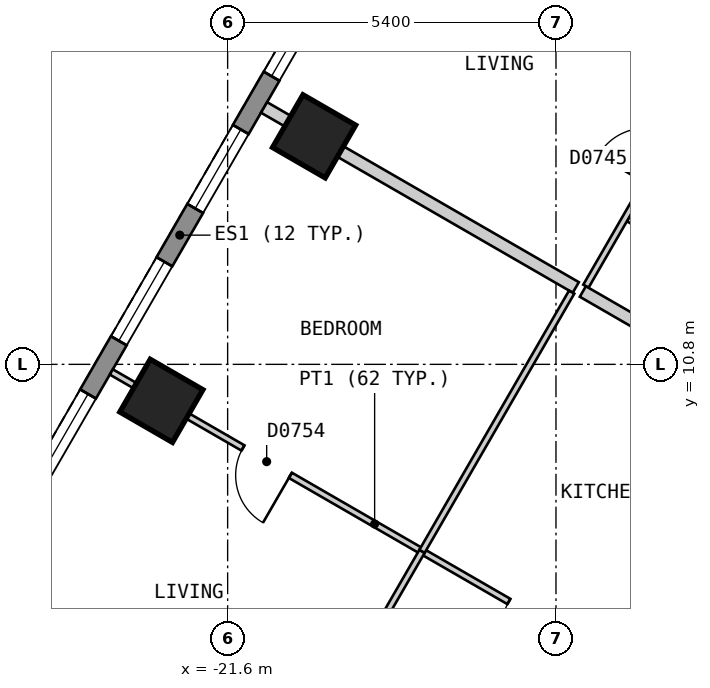
"""IFC4 building model, lengths in metres.
Left out: names, types, materials, properties, quantities, classifications, styles, units other than length and angle.
Written with IfcOpenShell. Run it as: python <this file> out.ifc"""

import sys

from ifc_helpers import new_model, si_unit, direction, frame, frame_2d, origin, origin_2d, place, context, subcontext, project, spatial, polyline, rectangle, outline, extrude, element, fill, save


model = new_model("IFC4")
c1 = context("Model", 3, precision=1e-05, world=origin(), true_north=direction((0.0, 1.0)))
c2 = subcontext(c1, "Body", "Model", "MODEL_VIEW")
j1 = project(units=[si_unit("LENGTHUNIT", "METRE"), si_unit("PLANEANGLEUNIT", "RADIAN")], contexts=[c1])
p1 = place(None, origin())
s1 = spatial("IfcSite", under=j1, at=p1, CompositionType="ELEMENT")
p2 = place(p1, origin())
s2 = spatial("IfcBuilding", under=s1, at=p2, CompositionType="ELEMENT")
p3 = place(p2, frame((0.0, 0.0, 93.0)))
s3 = spatial("IfcBuildingStorey", under=s2, at=p3, CompositionType="ELEMENT", Elevation=93.0)
for number, where, z_axis, x_axis in (
    (1, (-20.178, 14.55, 0.0), (0.0, 0.0, 1.0), (-0.5, -0.866, 0.0)),
    (2, (-22.69, 10.2, 0.0), (0.0, 0.0, 1.0), (-0.5, -0.866, 0.0)),
):
    element("IfcColumn", number, at=place(p3, frame(where, z_axis=z_axis, x_axis=x_axis)), inside=s3, PredefinedType="COLUMN", context=c2, shape_type="SweptSolid", body=[
        extrude(rectangle(XDim=1.0, YDim=1.0, at=origin_2d()), origin(), (0.0, 0.0, 1.0), 3.0),
    ])
p4 = place(p3, frame((-15.747, 24.425, 0.0), z_axis=(0.0, 0.0, 1.0), x_axis=(-0.500027479704, -0.866009537788, 0.0)))
e3 = element("IfcWall", 3, at=p4, inside=s3, PredefinedType="SOLIDWALL", context=c2, shape_type="SweptSolid", body=[
    extrude(outline(polyline([(0.0, -0.15), (26.559, -0.15), (26.478, 0.15), (0.08, 0.15), (0.0, -0.15)])), origin(), (0.0, 0.0, 1.0), 2.7),
])
p5 = place(p4, frame((1.227, 0.0, 0.15)))
e4 = element("IfcOpeningElement", 4, at=p5, cuts=e3, PredefinedType="OPENING", context=c2, shape_type="SweptSolid", body=[
    extrude(rectangle(XDim=1.5, YDim=2.1, at=frame_2d((0.75, 1.05))), frame((0.0, 0.16, 0.0), z_axis=(0.0, -1.0, 0.0), x_axis=(1.0, 0.0, 0.0)), (0.0, 0.0, 1.0), 0.32),
])
p6 = place(p4, frame((3.739, 0.0, 0.15)))
e5 = element("IfcOpeningElement", 5, at=p6, cuts=e3, PredefinedType="OPENING", context=c2, shape_type="SweptSolid", body=[
    extrude(rectangle(XDim=1.5, YDim=2.1, at=frame_2d((0.75, 1.05))), frame((0.0, 0.16, 0.0), z_axis=(0.0, -1.0, 0.0), x_axis=(1.0, 0.0, 0.0)), (0.0, 0.0, 1.0), 0.32),
])
p7 = place(p4, frame((6.25, 0.0, 0.15)))
e6 = element("IfcOpeningElement", 6, at=p7, cuts=e3, PredefinedType="OPENING", context=c2, shape_type="SweptSolid", body=[
    extrude(rectangle(XDim=1.5, YDim=2.1, at=frame_2d((0.75, 1.05))), frame((0.0, 0.16, 0.0), z_axis=(0.0, -1.0, 0.0), x_axis=(1.0, 0.0, 0.0)), (0.0, 0.0, 1.0), 0.32),
])
p8 = place(p4, frame((8.761, 0.0, 0.15)))
e7 = element("IfcOpeningElement", 7, at=p8, cuts=e3, PredefinedType="OPENING", context=c2, shape_type="SweptSolid", body=[
    extrude(rectangle(XDim=1.5, YDim=2.1, at=frame_2d((0.75, 1.05))), frame((0.0, 0.16, 0.0), z_axis=(0.0, -1.0, 0.0), x_axis=(1.0, 0.0, 0.0)), (0.0, 0.0, 1.0), 0.32),
])
p9 = place(p4, frame((11.273, 0.0, 0.15)))
e8 = element("IfcOpeningElement", 8, at=p9, cuts=e3, PredefinedType="OPENING", context=c2, shape_type="SweptSolid", body=[
    extrude(rectangle(XDim=1.5, YDim=2.1, at=frame_2d((0.75, 1.05))), frame((0.0, 0.16, 0.0), z_axis=(0.0, -1.0, 0.0), x_axis=(1.0, 0.0, 0.0)), (0.0, 0.0, 1.0), 0.32),
])
p10 = place(p4, frame((13.785, 0.0, 0.15)))
e9 = element("IfcOpeningElement", 9, at=p10, cuts=e3, PredefinedType="OPENING", context=c2, shape_type="SweptSolid", body=[
    extrude(rectangle(XDim=1.5, YDim=2.1, at=frame_2d((0.75, 1.05))), frame((0.0, 0.16, 0.0), z_axis=(0.0, -1.0, 0.0), x_axis=(1.0, 0.0, 0.0)), (0.0, 0.0, 1.0), 0.32),
])
p11 = place(p4, frame((16.296, 0.0, 0.15)))
e10 = element("IfcOpeningElement", 10, at=p11, cuts=e3, PredefinedType="OPENING", context=c2, shape_type="SweptSolid", body=[
    extrude(rectangle(XDim=1.5, YDim=2.1, at=frame_2d((0.75, 1.05))), frame((0.0, 0.16, 0.0), z_axis=(0.0, -1.0, 0.0), x_axis=(1.0, 0.0, 0.0)), (0.0, 0.0, 1.0), 0.32),
])
p12 = place(p4, frame((18.807, 0.0, 0.15)))
e11 = element("IfcOpeningElement", 11, at=p12, cuts=e3, PredefinedType="OPENING", context=c2, shape_type="SweptSolid", body=[
    extrude(rectangle(XDim=1.5, YDim=2.1, at=frame_2d((0.75, 1.05))), frame((0.0, 0.16, 0.0), z_axis=(0.0, -1.0, 0.0), x_axis=(1.0, 0.0, 0.0)), (0.0, 0.0, 1.0), 0.32),
])
p13 = place(p4, frame((21.319, 0.0, 0.15)))
e12 = element("IfcOpeningElement", 12, at=p13, cuts=e3, PredefinedType="OPENING", context=c2, shape_type="SweptSolid", body=[
    extrude(rectangle(XDim=1.5, YDim=2.1, at=frame_2d((0.75, 1.05))), frame((0.0, 0.16, 0.0), z_axis=(0.0, -1.0, 0.0), x_axis=(1.0, 0.0, 0.0)), (0.0, 0.0, 1.0), 0.32),
])
p14 = place(p4, frame((23.831, 0.0, 0.15)))
e13 = element("IfcOpeningElement", 13, at=p14, cuts=e3, PredefinedType="OPENING", context=c2, shape_type="SweptSolid", body=[
    extrude(rectangle(XDim=1.5, YDim=2.1, at=frame_2d((0.75, 1.05))), frame((0.0, 0.16, 0.0), z_axis=(0.0, -1.0, 0.0), x_axis=(1.0, 0.0, 0.0)), (0.0, 0.0, 1.0), 0.32),
])
p15 = place(p3, frame((-16.05, -1.0, 0.0), z_axis=(0.0, 0.0, 1.0), x_axis=(0.499962449088, 0.866047082728, 0.0)))
e14 = element("IfcWall", 14, at=p15, inside=s3, PredefinedType="PARTITIONING", context=c2, shape_type="SweptSolid", body=[
    extrude(rectangle(XDim=10.391, YDim=0.2, at=frame_2d((5.195, 0.0))), origin(), (0.0, 0.0, 1.0), 2.7),
])
p16 = place(p15, frame((4.745, 0.0, 0.0)))
e15 = element("IfcOpeningElement", 15, at=p16, cuts=e14, PredefinedType="OPENING", context=c2, shape_type="SweptSolid", body=[
    extrude(rectangle(XDim=0.9, YDim=2.1, at=frame_2d((0.45, 1.05))), frame((0.0, 0.11, 0.0), z_axis=(0.0, -1.0, 0.0), x_axis=(1.0, 0.0, 0.0)), (0.0, 0.0, 1.0), 0.22),
])
p17 = place(p3, frame((-18.533, -0.901, 0.0), z_axis=(0.0, 0.0, 1.0), x_axis=(0.499981198768, 0.866036258409, 0.0)))
e16 = element("IfcWall", 16, at=p17, inside=s3, PredefinedType="PARTITIONING", context=c2, shape_type="SweptSolid", body=[
    extrude(rectangle(XDim=20.093, YDim=0.2, at=frame_2d((10.046, 0.0))), origin(), (0.0, 0.0, 1.0), 2.7),
])
p18 = place(p17, frame((14.57, 0.0, 0.0)))
e17 = element("IfcOpeningElement", 17, at=p18, cuts=e16, PredefinedType="OPENING", context=c2, shape_type="SweptSolid", body=[
    extrude(rectangle(XDim=1.0, YDim=2.1, at=frame_2d((0.5, 1.05))), frame((0.0, 0.11, 0.0), z_axis=(0.0, -1.0, 0.0), x_axis=(1.0, 0.0, 0.0)), (0.0, 0.0, 1.0), 0.22),
])
p19 = place(p17, frame((4.523, 0.0, 0.0)))
e18 = element("IfcOpeningElement", 18, at=p19, cuts=e16, PredefinedType="OPENING", context=c2, shape_type="SweptSolid", body=[
    extrude(rectangle(XDim=1.0, YDim=2.1, at=frame_2d((0.5, 1.05))), frame((0.0, 0.11, 0.0), z_axis=(0.0, -1.0, 0.0), x_axis=(1.0, 0.0, 0.0)), (0.0, 0.0, 1.0), 0.22),
])
p20 = place(p3, frame((-23.513, 10.675, 0.0), z_axis=(0.0, 0.0, 1.0), x_axis=(0.866041268327, -0.499972520799, 0.0)))
e19 = element("IfcWall", 19, at=p20, inside=s3, PredefinedType="PARTITIONING", context=c2, shape_type="SweptSolid", body=[
    extrude(rectangle(XDim=10.0, YDim=0.1, at=frame_2d((5.0, 0.0))), origin(), (0.0, 0.0, 1.0), 2.7),
])
p21 = place(p20, frame((7.55, 0.0, 0.0)))
e20 = element("IfcOpeningElement", 20, at=p21, cuts=e19, PredefinedType="OPENING", context=c2, shape_type="SweptSolid", body=[
    extrude(rectangle(XDim=0.9, YDim=2.1, at=frame_2d((0.45, 1.05))), frame((0.0, 0.06, 0.0), z_axis=(0.0, -1.0, 0.0), x_axis=(1.0, 0.0, 0.0)), (0.0, 0.0, 1.0), 0.12),
])
p22 = place(p20, frame((2.5, 0.0, 0.0)))
e21 = element("IfcOpeningElement", 21, at=p22, cuts=e19, PredefinedType="OPENING", context=c2, shape_type="SweptSolid", body=[
    extrude(rectangle(XDim=0.9, YDim=2.1, at=frame_2d((0.45, 1.05))), frame((0.0, 0.06, 0.0), z_axis=(0.0, -1.0, 0.0), x_axis=(1.0, 0.0, 0.0)), (0.0, 0.0, 1.0), 0.12),
])
p23 = place(p3, frame((-15.009, 13.196, 0.0), z_axis=(0.0, 0.0, 1.0), x_axis=(0.865916335424, -0.500188864377, 0.0)))
e22 = element("IfcWall", 22, at=p23, inside=s3, PredefinedType="PARTITIONING", context=c2, shape_type="SweptSolid", body=[
    extrude(rectangle(XDim=3.896, YDim=0.1, at=frame_2d((1.948, 0.0))), origin(), (0.0, 0.0, 1.0), 2.7),
])
p24 = place(p23, frame((1.573, 0.0, 0.0)))
e23 = element("IfcOpeningElement", 23, at=p24, cuts=e22, PredefinedType="OPENING", context=c2, shape_type="SweptSolid", body=[
    extrude(rectangle(XDim=0.8, YDim=2.1, at=frame_2d((0.4, 1.05))), frame((0.0, 0.06, 0.0), z_axis=(0.0, -1.0, 0.0), x_axis=(1.0, 0.0, 0.0)), (0.0, 0.0, 1.0), 0.12),
])
p25 = place(p3, frame((-18.489, 19.375, 0.0), z_axis=(0.0, 0.0, 1.0), x_axis=(0.866016855193, -0.500014806302, 0.0)))
e24 = element("IfcWall", 24, at=p25, inside=s3, PredefinedType="PARTITIONING", context=c2, shape_type="SweptSolid", body=[
    extrude(rectangle(XDim=10.0, YDim=0.1, at=frame_2d((5.0, 0.0))), origin(), (0.0, 0.0, 1.0), 2.7),
])
p26 = place(p25, frame((2.577, 0.0, 0.0)))
e25 = element("IfcOpeningElement", 25, at=p26, cuts=e24, PredefinedType="OPENING", context=c2, shape_type="SweptSolid", body=[
    extrude(rectangle(XDim=0.9, YDim=2.1, at=frame_2d((0.45, 1.05))), frame((0.0, 0.06, 0.0), z_axis=(0.0, -1.0, 0.0), x_axis=(1.0, 0.0, 0.0)), (0.0, 0.0, 1.0), 0.12),
])
p27 = place(p3, frame((-15.708, 12.085, 0.0), z_axis=(0.0, 0.0, 1.0), x_axis=(0.499943653708, 0.866057932887, 0.0)))
e26 = element("IfcWall", 26, at=p27, inside=s3, PredefinedType="PARTITIONING", context=c2, shape_type="SweptSolid", body=[
    extrude(rectangle(XDim=4.873, YDim=0.1, at=frame_2d((2.436, 0.0))), origin(), (0.0, 0.0, 1.0), 2.7),
])
p28 = place(p27, frame((1.962, 0.0, 0.0)))
e27 = element("IfcOpeningElement", 27, at=p28, cuts=e26, PredefinedType="OPENING", context=c2, shape_type="SweptSolid", body=[
    extrude(rectangle(XDim=0.9, YDim=2.1, at=frame_2d((0.45, 1.05))), frame((0.0, 0.06, 0.0), z_axis=(0.0, -1.0, 0.0), x_axis=(1.0, 0.0, 0.0)), (0.0, 0.0, 1.0), 0.12),
])
p29 = place(p3, frame((-20.89, 3.418, 0.0), z_axis=(0.0, 0.0, 1.0), x_axis=(0.500014231302, 0.866017187182, 0.0)))
e28 = element("IfcWall", 28, at=p29, inside=s3, PredefinedType="PARTITIONING", context=c2, shape_type="SweptSolid", body=[
    extrude(rectangle(XDim=4.973, YDim=0.1, at=frame_2d((2.487, 0.0))), origin(), (0.0, 0.0, 1.0), 2.7),
])
p30 = place(p29, frame((2.011, 0.0, 0.0)))
e29 = element("IfcOpeningElement", 29, at=p30, cuts=e28, PredefinedType="OPENING", context=c2, shape_type="SweptSolid", body=[
    extrude(rectangle(XDim=0.9, YDim=2.1, at=frame_2d((0.45, 1.05))), frame((0.0, 0.06, 0.0), z_axis=(0.0, -1.0, 0.0), x_axis=(1.0, 0.0, 0.0)), (0.0, 0.0, 1.0), 0.12),
])
p31 = place(p3, frame((-21.001, 15.025, 0.0), z_axis=(0.0, 0.0, 1.0), x_axis=(0.866031754707, -0.499988999718, 0.0)))
e30 = element("IfcWall", 30, at=p31, inside=s3, PredefinedType="PARTITIONING", context=c2, shape_type="SweptSolid", body=[
    extrude(rectangle(XDim=5.92, YDim=0.2, at=frame_2d((2.96, 0.0))), origin(), (0.0, 0.0, 1.0), 2.7),
])
p32 = place(p3, frame((-15.758, 11.998, 0.0), z_axis=(0.0, 0.0, 1.0), x_axis=(0.865987741337, -0.5000652276, 0.0)))
e31 = element("IfcWall", 31, at=p32, inside=s3, PredefinedType="PARTITIONING", context=c2, shape_type="SweptSolid", body=[
    extrude(rectangle(XDim=3.946, YDim=0.2, at=frame_2d((1.973, 0.0))), origin(), (0.0, 0.0, 1.0), 2.7),
])
p33 = place(p3, frame((-18.403, 7.725, 0.0), z_axis=(0.0, 0.0, 1.0), x_axis=(0.499995794706, 0.866027831699, 0.0)))
e32 = element("IfcWall", 32, at=p33, inside=s3, PredefinedType="PARTITIONING", context=c2, shape_type="SweptSolid", body=[
    extrude(rectangle(XDim=4.922, YDim=0.1, at=frame_2d((2.461, 0.0))), origin(), (0.0, 0.0, 1.0), 2.7),
])
p34 = place(p8, origin())
e33 = element("IfcWindow", 33, at=p34, inside=s3, PartitioningType="SINGLE_PANEL", PredefinedType="WINDOW", context=c2, shape_type="SweptSolid", body=[
    extrude(rectangle(XDim=1.5, YDim=2.1, at=frame_2d((0.75, 1.05))), frame((0.0, 0.03, 0.0), z_axis=(0.0, -1.0, 0.0), x_axis=(1.0, 0.0, 0.0)), (0.0, 0.0, 1.0), 0.06),
])
fill(e7, e33)
p35 = place(p9, origin())
e34 = element("IfcWindow", 34, at=p35, inside=s3, PartitioningType="SINGLE_PANEL", PredefinedType="WINDOW", context=c2, shape_type="SweptSolid", body=[
    extrude(rectangle(XDim=1.5, YDim=2.1, at=frame_2d((0.75, 1.05))), frame((0.0, 0.03, 0.0), z_axis=(0.0, -1.0, 0.0), x_axis=(1.0, 0.0, 0.0)), (0.0, 0.0, 1.0), 0.06),
])
fill(e8, e34)
p36 = place(p10, origin())
e35 = element("IfcWindow", 35, at=p36, inside=s3, PartitioningType="SINGLE_PANEL", PredefinedType="WINDOW", context=c2, shape_type="SweptSolid", body=[
    extrude(rectangle(XDim=1.5, YDim=2.1, at=frame_2d((0.75, 1.05))), frame((0.0, 0.03, 0.0), z_axis=(0.0, -1.0, 0.0), x_axis=(1.0, 0.0, 0.0)), (0.0, 0.0, 1.0), 0.06),
])
fill(e9, e35)
p37 = place(p11, origin())
e36 = element("IfcWindow", 36, at=p37, inside=s3, PartitioningType="SINGLE_PANEL", PredefinedType="WINDOW", context=c2, shape_type="SweptSolid", body=[
    extrude(rectangle(XDim=1.5, YDim=2.1, at=frame_2d((0.75, 1.05))), frame((0.0, 0.03, 0.0), z_axis=(0.0, -1.0, 0.0), x_axis=(1.0, 0.0, 0.0)), (0.0, 0.0, 1.0), 0.06),
])
fill(e10, e36)
p38 = place(p21, origin())
e37 = element("IfcDoor", 37, at=p38, inside=s3, OperationType="SINGLE_SWING_RIGHT", PredefinedType="DOOR", context=c2, shape_type="SweptSolid", body=[
    extrude(rectangle(XDim=0.9, YDim=2.1, at=frame_2d((0.45, 1.05))), frame((0.0, 0.025, 0.0), z_axis=(0.0, -1.0, 0.0), x_axis=(1.0, 0.0, 0.0)), (0.0, 0.0, 1.0), 0.05),
])
fill(e20, e37)
p39 = place(p22, origin())
e38 = element("IfcDoor", 38, at=p39, inside=s3, OperationType="SINGLE_SWING_RIGHT", PredefinedType="DOOR", context=c2, shape_type="SweptSolid", body=[
    extrude(rectangle(XDim=0.9, YDim=2.1, at=frame_2d((0.45, 1.05))), frame((0.0, 0.025, 0.0), z_axis=(0.0, -1.0, 0.0), x_axis=(1.0, 0.0, 0.0)), (0.0, 0.0, 1.0), 0.05),
])
fill(e21, e38)
save(model, sys.argv[1])
